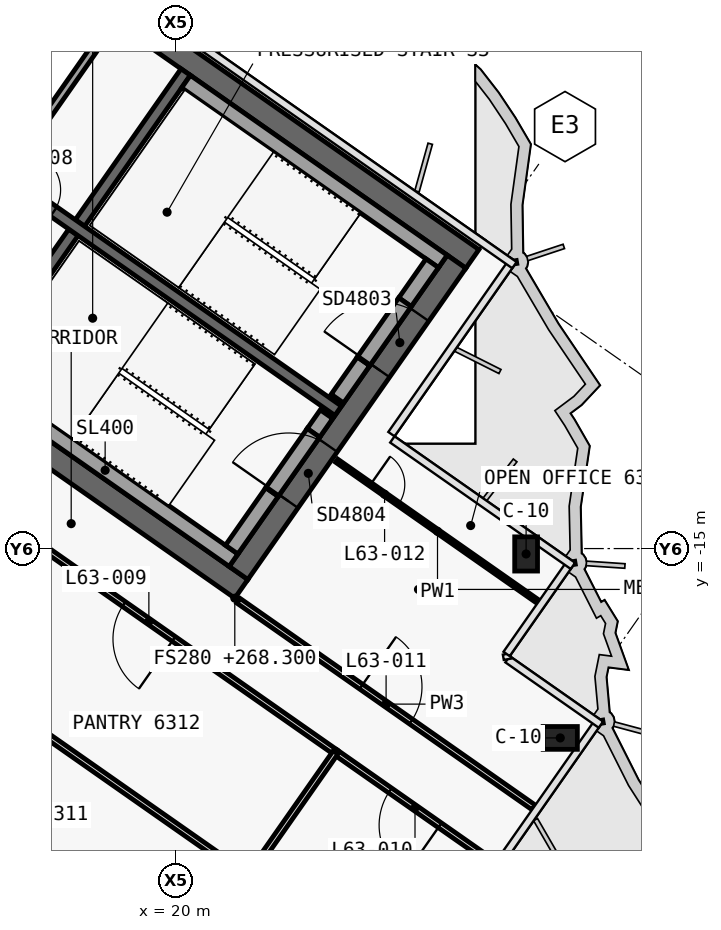
"""IFC4 building model, lengths in metres.
Left out: names, types, materials, properties, quantities, classifications, styles, units other than length and angle.
Written with IfcOpenShell. Run it as: python <this file> out.ifc"""

import sys

from ifc_helpers import new_model, si_unit, direction, frame, frame_2d, origin, origin_2d, place, context, subcontext, project, spatial, polyline, rectangle, outline, extrude, clip, halfspace, element, fill, save


model = new_model("IFC4")
c1 = context("Model", 3, precision=1e-05, world=origin(), true_north=direction((0.0, 1.0)))
c2 = subcontext(c1, "Body", "Model", "MODEL_VIEW")
j1 = project(units=[si_unit("LENGTHUNIT", "METRE"), si_unit("PLANEANGLEUNIT", "RADIAN")], contexts=[c1])
p1 = place(None, origin())
s1 = spatial("IfcSite", under=j1, at=p1, CompositionType="ELEMENT")
p2 = place(p1, origin())
s2 = spatial("IfcBuilding", under=s1, at=p2, CompositionType="ELEMENT")
p3 = place(p2, frame((0.0, 0.0, 268.3)))
s3 = spatial("IfcBuildingStorey", under=s2, at=p3, CompositionType="ELEMENT", Elevation=268.3)
p4 = place(p3, frame((0.028, 12.066, 0.0), z_axis=(0.0, 0.0, 1.0), x_axis=(0.819151382952, -0.573577380837, 0.0)))
e1 = element("IfcWall", 1, at=p4, inside=s3, PredefinedType="SHEAR", context=c2, shape_type="SweptSolid", body=[
    extrude(outline(polyline([(33.898, 0.3), (0.0, 0.3), (0.42, -0.3), (33.898, -0.3), (33.898, 0.3)])), origin(), (0.0, 0.0, 1.0), 3.9),
])
p5 = place(p3, frame((0.028, -0.874, 0.0), z_axis=(0.0, 0.0, 1.0), x_axis=(0.819150035022, -0.573579305871, 0.0)))
e2 = element("IfcWall", 2, at=p5, inside=s3, PredefinedType="SHEAR", context=c2, shape_type="SweptSolid", body=[
    extrude(outline(polyline([(26.476, 0.3), (0.0, 0.3), (0.42, -0.3), (26.476, -0.3), (26.476, 0.3)])), origin(), (0.0, 0.0, 1.0), 3.9),
])
p6 = place(p5, frame((1.026, 0.0, 0.0)))
e3 = element("IfcOpeningElement", 3, at=p6, cuts=e2, PredefinedType="OPENING", context=c2, shape_type="SweptSolid", body=[
    extrude(rectangle(XDim=1.5, YDim=2.1, at=frame_2d((0.75, 1.05))), frame((0.0, 0.31, 0.0), z_axis=(0.0, -1.0, 0.0), x_axis=(1.0, 0.0, 0.0)), (0.0, 0.0, 1.0), 0.62),
])
p7 = place(p5, frame((12.226, 0.0, 0.0)))
e4 = element("IfcOpeningElement", 4, at=p7, cuts=e2, PredefinedType="OPENING", context=c2, shape_type="SweptSolid", body=[
    extrude(rectangle(XDim=1.5, YDim=2.1, at=frame_2d((0.75, 1.05))), frame((0.0, 0.31, 0.0), z_axis=(0.0, -1.0, 0.0), x_axis=(1.0, 0.0, 0.0)), (0.0, 0.0, 1.0), 0.62),
])
p8 = place(p3, frame((21.642, -15.642, 0.0), z_axis=(0.0, 0.0, 1.0), x_axis=(0.573586866468, 0.819144740944, 0.0)))
e5 = element("IfcWall", 5, at=p8, inside=s3, PredefinedType="SHEAR", context=c2, shape_type="SweptSolid", body=[
    extrude(outline(polyline([(10.0, 0.3), (0.0, 0.3), (0.0, -0.3), (10.0, -0.3), (10.0, 0.3)])), origin(), (0.0, 0.0, 1.0), 3.9),
])
p9 = place(p8, frame((6.5, 0.0, 0.0)))
e6 = element("IfcOpeningElement", 6, at=p9, cuts=e5, PredefinedType="OPENING", context=c2, shape_type="SweptSolid", body=[
    extrude(rectangle(XDim=1.8, YDim=2.1, at=frame_2d((0.9, 1.05))), frame((0.0, 0.31, 0.0), z_axis=(0.0, -1.0, 0.0), x_axis=(1.0, 0.0, 0.0)), (0.0, 0.0, 1.0), 0.62),
])
p10 = place(p8, frame((2.3, 0.0, 0.0)))
e7 = element("IfcOpeningElement", 7, at=p10, cuts=e5, PredefinedType="OPENING", context=c2, shape_type="SweptSolid", body=[
    extrude(rectangle(XDim=1.8, YDim=2.1, at=frame_2d((0.9, 1.05))), frame((0.0, 0.31, 0.0), z_axis=(0.0, -1.0, 0.0), x_axis=(1.0, 0.0, 0.0)), (0.0, 0.0, 1.0), 0.62),
])
p11 = place(p3, frame((14.515, -10.652, 0.0), z_axis=(0.0, 0.0, 1.0), x_axis=(0.573560315113, 0.819163332265, 0.0)))
e8 = element("IfcWall", 8, at=p11, inside=s3, PredefinedType="SHEAR", context=c2, shape_type="SweptSolid", body=[
    extrude(outline(polyline([(0.0, 0.15), (0.0, -0.15), (4.85, -0.15), (4.85, 0.15), (0.0, 0.15)])), origin(), (0.0, 0.0, 1.0), 3.9),
])
p12 = place(p3, frame((17.469, -6.433, 0.0), z_axis=(0.0, 0.0, 1.0), x_axis=(0.573594092424, 0.81913968109, 0.0)))
e9 = element("IfcWall", 9, at=p12, inside=s3, PredefinedType="SHEAR", context=c2, shape_type="SweptSolid", body=[
    extrude(outline(polyline([(4.85, -0.15), (4.85, 0.15), (0.0, 0.15), (0.0, -0.15), (4.85, -0.15)])), origin(), (0.0, 0.0, 1.0), 3.9),
])
p13 = place(p3, frame((2.638, 3.768, 0.0), z_axis=(0.0, 0.0, 1.0), x_axis=(0.819155014212, -0.573572194837, 0.0)))
e10 = element("IfcWall", 10, at=p13, inside=s3, PredefinedType="SHEAR", context=c2, shape_type="SweptSolid", body=[
    extrude(outline(polyline([(0.0, 0.15), (0.0, -0.15), (26.4, -0.15), (26.4, 0.15), (0.0, 0.15)])), origin(), (0.0, 0.0, 1.0), 3.9),
])
p14 = place(p13, frame((9.637, 0.0, 0.0)))
e11 = element("IfcOpeningElement", 11, at=p14, cuts=e10, PredefinedType="OPENING", context=c2, shape_type="SweptSolid", body=[
    extrude(rectangle(XDim=1.2, YDim=2.1, at=frame_2d((0.6, 1.05))), frame((0.0, 0.16, 0.0), z_axis=(0.0, -1.0, 0.0), x_axis=(1.0, 0.0, 0.0)), (0.0, 0.0, 1.0), 0.32),
])
p15 = place(p13, frame((11.812, 0.0, 0.0)))
e12 = element("IfcOpeningElement", 12, at=p15, cuts=e10, PredefinedType="OPENING", context=c2, shape_type="SweptSolid", body=[
    extrude(rectangle(XDim=1.2, YDim=2.1, at=frame_2d((0.6, 1.05))), frame((0.0, 0.16, 0.0), z_axis=(0.0, -1.0, 0.0), x_axis=(1.0, 0.0, 0.0)), (0.0, 0.0, 1.0), 0.32),
])
p16 = place(p13, frame((13.988, 0.0, 0.0)))
e13 = element("IfcOpeningElement", 13, at=p16, cuts=e10, PredefinedType="OPENING", context=c2, shape_type="SweptSolid", body=[
    extrude(rectangle(XDim=1.2, YDim=2.1, at=frame_2d((0.6, 1.05))), frame((0.0, 0.16, 0.0), z_axis=(0.0, -1.0, 0.0), x_axis=(1.0, 0.0, 0.0)), (0.0, 0.0, 1.0), 0.32),
])
p17 = place(p13, frame((16.262, 0.0, 0.0)))
e14 = element("IfcOpeningElement", 14, at=p17, cuts=e10, PredefinedType="OPENING", context=c2, shape_type="SweptSolid", body=[
    extrude(rectangle(XDim=1.0, YDim=2.1, at=frame_2d((0.5, 1.05))), frame((0.0, 0.16, 0.0), z_axis=(0.0, -1.0, 0.0), x_axis=(1.0, 0.0, 0.0)), (0.0, 0.0, 1.0), 0.32),
])
p18 = place(p3, frame((29.363, -15.25, 0.0), z_axis=(-0.477740667047, 0.334477229622, 0.812335422048), x_axis=(0.665452651921, -0.465898707839, 0.583190502397)))
e15 = element("IfcColumn", 15, at=p18, inside=s3, PredefinedType="COLUMN", context=c2, shape_type="Clipping", body=[
    clip(clip(extrude(rectangle(XDim=0.9, YDim=0.6, at=origin_2d()), origin(), (0.0, 0.0, 1.0), 4.801), halfspace(frame((0.0, 0.0, 0.323), z_axis=(0.0, 0.0, 1.0), x_axis=(1.0, 0.0, 0.0)), True)), halfspace(frame((0.0, 0.0, 4.478), z_axis=(0.0, 0.0, 1.0), x_axis=(1.0, 0.0, 0.0)), False)),
])
p19 = place(p3, frame((30.211, -20.055, 0.0), z_axis=(-0.477769502493, 0.334528037995, 0.812297540488), x_axis=(0.573565197047, 0.819159914019, 0.0)))
e16 = element("IfcColumn", 16, at=p19, inside=s3, PredefinedType="COLUMN", context=c2, shape_type="Clipping", body=[
    clip(clip(extrude(rectangle(XDim=0.9, YDim=0.6, at=origin_2d()), origin(), (0.0, 0.0, 1.0), 4.801), halfspace(frame((0.0, 0.0, 0.215), z_axis=(0.0, 0.0, 1.0), x_axis=(1.0, 0.0, 0.0)), True)), halfspace(frame((0.0, 0.0, 4.585), z_axis=(0.0, 0.0, 1.0), x_axis=(1.0, 0.0, 0.0)), False)),
])
p20 = place(p3, frame((15.565, -5.1, 0.0), z_axis=(0.0, 0.0, 1.0), x_axis=(0.573560315113, 0.819163332265, 0.0)))
e17 = element("IfcWall", 17, at=p20, inside=s3, PredefinedType="SOLIDWALL", context=c2, shape_type="SweptSolid", body=[
    extrude(rectangle(XDim=4.85, YDim=0.2, at=frame_2d((2.425, 0.0))), origin(), (0.0, 0.0, 1.0), 3.9),
])
p21 = place(p3, frame((20.259, -2.71, 0.0), z_axis=(0.0, 0.0, 1.0), x_axis=(0.81914849389, -0.573581506813, 0.0)))
e18 = element("IfcWall", 18, at=p21, inside=s3, PredefinedType="SOLIDWALL", context=c2, shape_type="SweptSolid", body=[
    extrude(rectangle(XDim=8.25, YDim=0.4, at=frame_2d((4.125, 0.0))), origin(), (0.0, 0.0, 1.0), 3.62),
])
p22 = place(p3, frame((24.244, -11.055, 0.0), z_axis=(0.0, 0.0, 1.0), x_axis=(0.573571582932, 0.819155442668, 0.0)))
e19 = element("IfcWall", 19, at=p22, inside=s3, PredefinedType="SOLIDWALL", context=c2, shape_type="SweptSolid", body=[
    extrude(rectangle(XDim=1.2, YDim=0.4, at=frame_2d((0.6, 0.0))), origin(), (0.0, 0.0, 1.0), 3.62),
])
p23 = place(p3, frame((26.022, -8.515, 0.0), z_axis=(0.0, 0.0, 1.0), x_axis=(0.573619628835, 0.819121798889, 0.0)))
e20 = element("IfcWall", 20, at=p23, inside=s3, PredefinedType="SOLIDWALL", context=c2, shape_type="SweptSolid", body=[
    extrude(rectangle(XDim=1.25, YDim=0.4, at=frame_2d((0.625, 0.0))), origin(), (0.0, 0.0, 1.0), 3.62),
])
p24 = place(p3, frame((24.932, -10.072, 2.15), z_axis=(0.0, 0.0, 1.0), x_axis=(0.573591692345, 0.819141361715, 0.0)))
e21 = element("IfcWall", 21, at=p24, inside=s3, PredefinedType="SOLIDWALL", context=c2, shape_type="SweptSolid", body=[
    extrude(rectangle(XDim=1.9, YDim=0.4, at=frame_2d((0.95, 0.0))), origin(), (0.0, 0.0, 1.0), 1.47),
])
p25 = place(p3, frame((14.753, -10.574, 0.0), z_axis=(0.0, 0.0, 1.0), x_axis=(0.819158229677, -0.573567602601, 0.0)))
e22 = element("IfcWall", 22, at=p25, inside=s3, PredefinedType="SOLIDWALL", context=c2, shape_type="SweptSolid", body=[
    extrude(rectangle(XDim=8.25, YDim=0.4, at=frame_2d((4.125, 0.0))), origin(), (0.0, 0.0, 1.0), 3.62),
])
p26 = place(p3, frame((21.462, -15.028, 0.0), z_axis=(0.0, 0.0, 1.0), x_axis=(0.573559770908, 0.819163713305, 0.0)))
e23 = element("IfcWall", 23, at=p26, inside=s3, PredefinedType="SOLIDWALL", context=c2, shape_type="SweptSolid", body=[
    extrude(rectangle(XDim=1.85, YDim=0.4, at=frame_2d((0.925, 0.0))), origin(), (0.0, 0.0, 1.0), 3.62),
])
p27 = place(p3, frame((23.613, -11.956, 0.0), z_axis=(0.0, 0.0, 1.0), x_axis=(0.573435029941, 0.819251039936, 0.0)))
e24 = element("IfcWall", 24, at=p27, inside=s3, PredefinedType="SOLIDWALL", context=c2, shape_type="SweptSolid", body=[
    extrude(rectangle(XDim=0.6, YDim=0.4, at=frame_2d((0.3, 0.0))), origin(), (0.0, 0.0, 1.0), 3.62),
])
p28 = place(p3, frame((22.523, -13.512, 2.15), z_axis=(0.0, 0.0, 1.0), x_axis=(0.573591692345, 0.819141361715, 0.0)))
e25 = element("IfcWall", 25, at=p28, inside=s3, PredefinedType="SOLIDWALL", context=c2, shape_type="SweptSolid", body=[
    extrude(rectangle(XDim=1.9, YDim=0.4, at=frame_2d((0.95, 0.0))), origin(), (0.0, 0.0, 1.0), 1.47),
])
p29 = place(p3, frame((21.642, -16.375, 0.0), z_axis=(0.0, 0.0, 1.0), x_axis=(0.819154480923, -0.573572956461, 0.0)))
e26 = element("IfcWall", 26, at=p29, inside=s3, PredefinedType="PARTITIONING", context=c2, shape_type="SweptSolid", body=[
    extrude(rectangle(XDim=9.48, YDim=0.15, at=frame_2d((4.74, 0.0))), origin(), (0.0, 0.0, 1.0), 3.0),
])
p30 = place(p29, frame((3.94, 0.0, 0.0)))
e27 = element("IfcOpeningElement", 27, at=p30, cuts=e26, PredefinedType="OPENING", context=c2, shape_type="SweptSolid", body=[
    extrude(rectangle(XDim=1.6, YDim=2.1, at=frame_2d((0.8, 1.05))), frame((0.0, 0.085, 0.0), z_axis=(0.0, -1.0, 0.0), x_axis=(1.0, 0.0, 0.0)), (0.0, 0.0, 1.0), 0.17),
])
p31 = place(p3, frame((24.199, -20.362, 0.0), z_axis=(0.0, 0.0, 1.0), x_axis=(-0.819164075089, 0.573559254204, 0.0)))
e28 = element("IfcWall", 28, at=p31, inside=s3, PredefinedType="PARTITIONING", context=c2, shape_type="SweptSolid", body=[
    extrude(rectangle(XDim=12.004, YDim=0.15, at=frame_2d((6.002, 0.0))), origin(), (0.0, 0.0, 1.0), 3.05),
])
p32 = place(p31, frame((5.202, 0.0, 0.0)))
e29 = element("IfcOpeningElement", 29, at=p32, cuts=e28, PredefinedType="OPENING", context=c2, shape_type="SweptSolid", body=[
    extrude(rectangle(XDim=1.6, YDim=2.1, at=frame_2d((0.8, 1.05))), frame((0.0, 0.085, 0.0), z_axis=(0.0, -1.0, 0.0), x_axis=(1.0, 0.0, 0.0)), (0.0, 0.0, 1.0), 0.17),
])
p33 = place(p3, frame((28.375, -23.287, 0.0), z_axis=(0.0, 0.0, 1.0), x_axis=(-0.819148735933, 0.573581161144, 0.0)))
e30 = element("IfcWall", 30, at=p33, inside=s3, PredefinedType="PARTITIONING", context=c2, shape_type="SweptSolid", body=[
    extrude(rectangle(XDim=5.102, YDim=0.15, at=frame_2d((2.551, 0.0))), origin(), (0.0, 0.0, 1.0), 3.0),
])
p34 = place(p33, frame((1.751, 0.0, 0.0)))
e31 = element("IfcOpeningElement", 31, at=p34, cuts=e30, PredefinedType="OPENING", context=c2, shape_type="SweptSolid", body=[
    extrude(rectangle(XDim=1.6, YDim=2.1, at=frame_2d((0.8, 1.05))), frame((0.0, 0.085, 0.0), z_axis=(0.0, -1.0, 0.0), x_axis=(1.0, 0.0, 0.0)), (0.0, 0.0, 1.0), 0.17),
])
p35 = place(p3, frame((24.223, -12.688, 0.0), z_axis=(0.0, 0.0, 1.0), x_axis=(0.819150491754, -0.573578653595, 0.0)))
e32 = element("IfcWall", 32, at=p35, inside=s3, PredefinedType="PARTITIONING", context=c2, shape_type="SweptSolid", body=[
    extrude(rectangle(XDim=6.48, YDim=0.1, at=frame_2d((3.24, 0.0))), origin(), (0.0, 0.0, 1.0), 3.0),
])
p36 = place(p35, frame((1.09, 0.0, 0.0)))
e33 = element("IfcOpeningElement", 33, at=p36, cuts=e32, PredefinedType="OPENING", context=c2, shape_type="SweptSolid", body=[
    extrude(rectangle(XDim=0.9, YDim=2.1, at=frame_2d((0.45, 1.05))), frame((0.0, 0.06, 0.0), z_axis=(0.0, -1.0, 0.0), x_axis=(1.0, 0.0, 0.0)), (0.0, 0.0, 1.0), 0.12),
])
p37 = place(p3, frame((12.073, -16.756, 0.0), z_axis=(0.0, 0.0, 1.0), x_axis=(0.819156404271, -0.573570209602, 0.0)))
e34 = element("IfcWall", 34, at=p37, inside=s3, PredefinedType="PARTITIONING", context=c2, shape_type="SweptSolid", body=[
    extrude(rectangle(XDim=12.0, YDim=0.15, at=frame_2d((6.0, 0.0))), origin(), (0.0, 0.0, 1.0), 3.05),
])
p38 = place(p3, frame((24.197, -20.361, 0.0), z_axis=(0.0, 0.0, 1.0), x_axis=(-0.573556557423, -0.819165963305, 0.0)))
e35 = element("IfcWall", 35, at=p38, inside=s3, PredefinedType="PARTITIONING", context=c2, shape_type="SweptSolid", body=[
    extrude(rectangle(XDim=4.0, YDim=0.15, at=frame_2d((2.0, 0.0))), origin(), (0.0, 0.0, 1.0), 3.05),
])
p39 = place(p17, origin())
e36 = element("IfcDoor", 36, at=p39, inside=s3, OperationType="SINGLE_SWING_RIGHT", PredefinedType="DOOR", context=c2, shape_type="SweptSolid", body=[
    extrude(rectangle(XDim=1.0, YDim=2.1, at=frame_2d((0.5, 1.05))), frame((0.0, 0.025, 0.0), z_axis=(0.0, -1.0, 0.0), x_axis=(1.0, 0.0, 0.0)), (0.0, 0.0, 1.0), 0.05),
])
fill(e14, e36)
p40 = place(p9, origin())
e37 = element("IfcDoor", 37, at=p40, inside=s3, OperationType="DOUBLE_DOOR_SINGLE_SWING", PredefinedType="DOOR", context=c2, shape_type="SweptSolid", body=[
    extrude(rectangle(XDim=1.8, YDim=2.1, at=frame_2d((0.9, 1.05))), frame((0.0, 0.025, 0.0), z_axis=(0.0, -1.0, 0.0), x_axis=(1.0, 0.0, 0.0)), (0.0, 0.0, 1.0), 0.05),
])
fill(e6, e37)
p41 = place(p10, origin())
e38 = element("IfcDoor", 38, at=p41, inside=s3, OperationType="DOUBLE_DOOR_SINGLE_SWING", PredefinedType="DOOR", context=c2, shape_type="SweptSolid", body=[
    extrude(rectangle(XDim=1.8, YDim=2.1, at=frame_2d((0.9, 1.05))), frame((0.0, 0.025, 0.0), z_axis=(0.0, -1.0, 0.0), x_axis=(1.0, 0.0, 0.0)), (0.0, 0.0, 1.0), 0.05),
])
fill(e7, e38)
p42 = place(p32, origin())
e39 = element("IfcDoor", 39, at=p42, inside=s3, OperationType="DOUBLE_DOOR_SINGLE_SWING", PredefinedType="DOOR", context=c2, shape_type="SweptSolid", body=[
    extrude(rectangle(XDim=1.6, YDim=2.1, at=frame_2d((0.8, 1.05))), frame((0.0, 0.025, 0.0), z_axis=(0.0, -1.0, 0.0), x_axis=(1.0, 0.0, 0.0)), (0.0, 0.0, 1.0), 0.05),
])
fill(e29, e39)
p43 = place(p34, origin())
e40 = element("IfcDoor", 40, at=p43, inside=s3, OperationType="DOUBLE_DOOR_SINGLE_SWING", PredefinedType="DOOR", context=c2, shape_type="SweptSolid", body=[
    extrude(rectangle(XDim=1.6, YDim=2.1, at=frame_2d((0.8, 1.05))), frame((0.0, 0.025, 0.0), z_axis=(0.0, -1.0, 0.0), x_axis=(1.0, 0.0, 0.0)), (0.0, 0.0, 1.0), 0.05),
])
fill(e31, e40)
p44 = place(p30, origin())
e41 = element("IfcDoor", 41, at=p44, inside=s3, OperationType="DOUBLE_DOOR_SINGLE_SWING", PredefinedType="DOOR", context=c2, shape_type="SweptSolid", body=[
    extrude(rectangle(XDim=1.6, YDim=2.1, at=frame_2d((0.8, 1.05))), frame((0.0, 0.025, 0.0), z_axis=(0.0, -1.0, 0.0), x_axis=(1.0, 0.0, 0.0)), (0.0, 0.0, 1.0), 0.05),
])
fill(e27, e41)
p45 = place(p36, origin())
e42 = element("IfcDoor", 42, at=p45, inside=s3, OperationType="SINGLE_SWING_LEFT", PredefinedType="DOOR", context=c2, shape_type="SweptSolid", body=[
    extrude(rectangle(XDim=0.9, YDim=2.1, at=frame_2d((0.45, 1.05))), frame((0.0, 0.025, 0.0), z_axis=(0.0, -1.0, 0.0), x_axis=(1.0, 0.0, 0.0)), (0.0, 0.0, 1.0), 0.05),
])
fill(e33, e42)
save(model, sys.argv[1])
